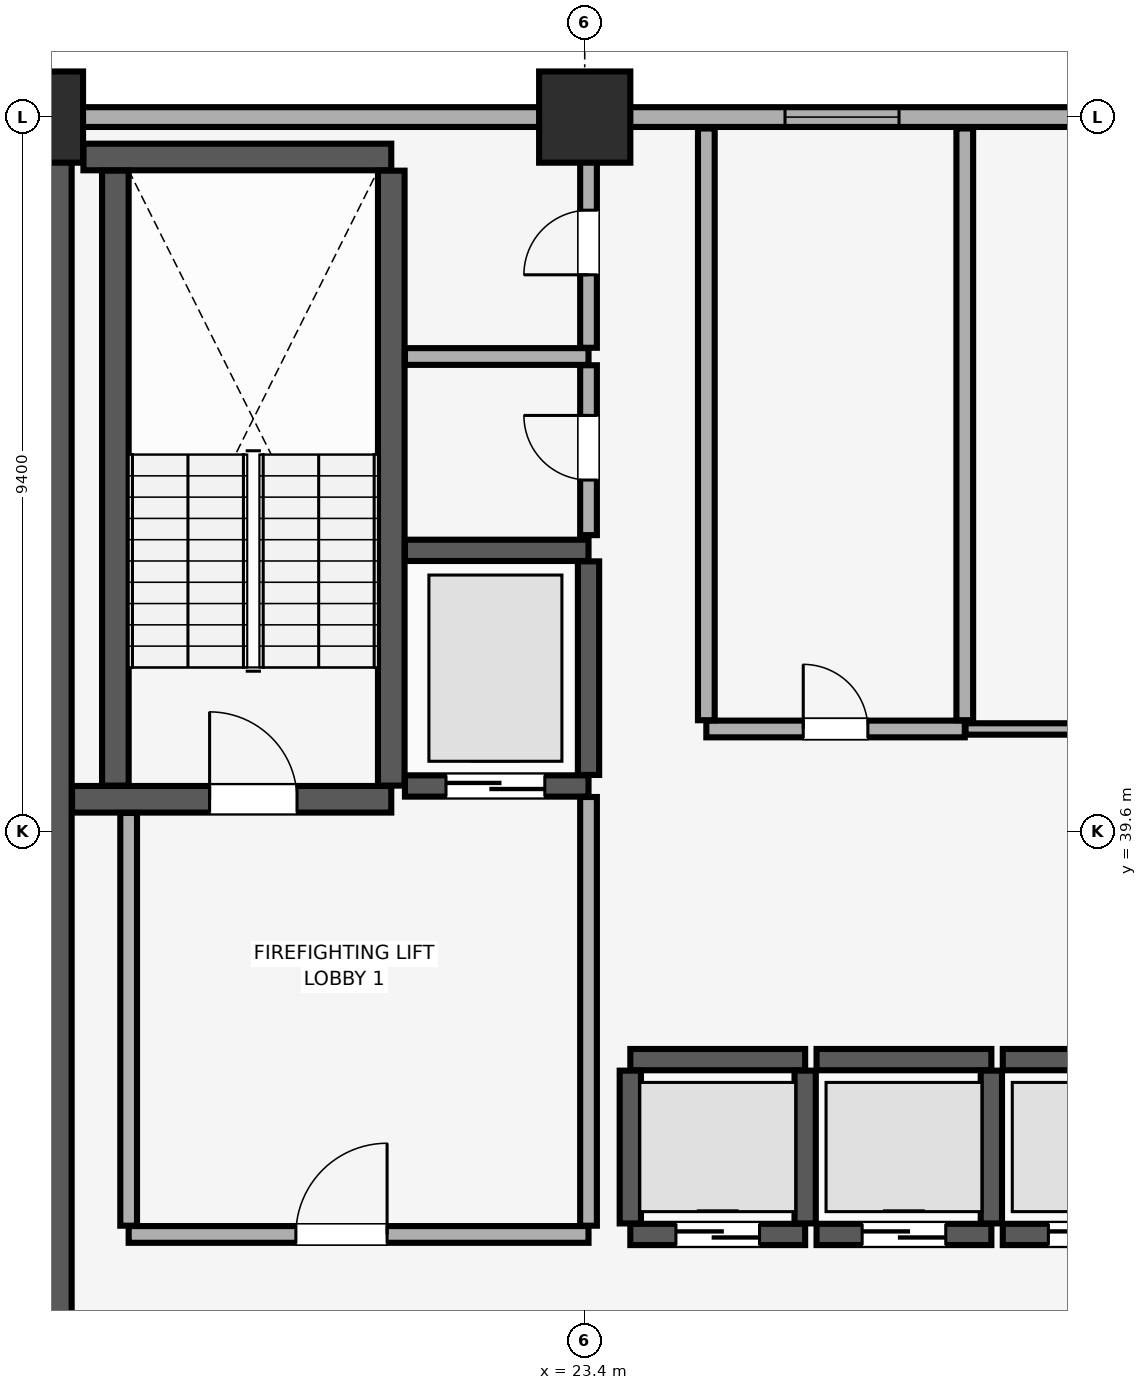
"""IFC4 building model, lengths in metres.
Left out: names, types, materials, properties, quantities, classifications, styles, units other than length and angle.
Written with IfcOpenShell. Run it as: python <this file> out.ifc"""

import sys

from ifc_helpers import new_model, si_unit, direction, frame, frame_2d, origin, origin_2d, place, context, subcontext, project, spatial, rectangle, extrude, element, fill, save


model = new_model("IFC4")
c1 = context("Model", 3, precision=1e-05, world=origin(), true_north=direction((0.0, 1.0)))
c2 = subcontext(c1, "Body", "Model", "MODEL_VIEW")
j1 = project(units=[si_unit("LENGTHUNIT", "METRE"), si_unit("PLANEANGLEUNIT", "RADIAN")], contexts=[c1])
p1 = place(None, origin())
s1 = spatial("IfcSite", under=j1, at=p1, CompositionType="ELEMENT")
p2 = place(p1, origin())
s2 = spatial("IfcBuilding", under=s1, at=p2, CompositionType="ELEMENT")
p3 = place(p2, frame((0.0, 0.0, 93.05)))
s3 = spatial("IfcBuildingStorey", under=s2, at=p3, CompositionType="ELEMENT", Elevation=93.05)
for number, where, z_axis, x_axis in (
    (1, (16.2, 49.0, 0.0), (0.0, 0.0, 1.0), (1.0, 0.0, 0.0)),
    (2, (23.4, 49.0, 0.0), (0.0, 0.0, 1.0), (1.0, 0.0, 0.0)),
):
    element("IfcColumn", number, at=place(p3, frame(where, z_axis=z_axis, x_axis=x_axis)), inside=s3, PredefinedType="COLUMN", context=c2, shape_type="SweptSolid", body=[
        extrude(rectangle(XDim=1.2, YDim=1.2, at=origin_2d()), origin(), (0.0, 0.0, 1.0), 3.51),
    ])
p4 = place(p3, frame((79.8, 49.0, 0.0), z_axis=(0.0, 0.0, 1.0), x_axis=(-1.0, 0.0, 0.0)))
e3 = element("IfcWall", 3, at=p4, inside=s3, PredefinedType="SOLIDWALL", context=c2, shape_type="SweptSolid", body=[
    extrude(rectangle(XDim=75.6, YDim=0.26, at=frame_2d((37.8, 0.0))), origin(), (0.0, 0.0, 1.0), 2.56),
])
p5 = place(p4, frame((72.565, 0.0, 0.85)))
e4 = element("IfcOpeningElement", 4, at=p5, cuts=e3, PredefinedType="OPENING", context=c2, shape_type="SweptSolid", body=[
    extrude(rectangle(XDim=1.5, YDim=1.4, at=frame_2d((0.75, 0.7))), frame((0.0, 0.14, 0.0), z_axis=(0.0, -1.0, 0.0), x_axis=(1.0, 0.0, 0.0)), (0.0, 0.0, 1.0), 0.28),
])
p6 = place(p4, frame((67.45, 0.0, 0.85)))
e5 = element("IfcOpeningElement", 5, at=p6, cuts=e3, PredefinedType="OPENING", context=c2, shape_type="SweptSolid", body=[
    extrude(rectangle(XDim=1.5, YDim=1.4, at=frame_2d((0.75, 0.7))), frame((0.0, 0.14, 0.0), z_axis=(0.0, -1.0, 0.0), x_axis=(1.0, 0.0, 0.0)), (0.0, 0.0, 1.0), 0.28),
])
p7 = place(p4, frame((7.6, 0.0, 0.85)))
e6 = element("IfcOpeningElement", 6, at=p7, cuts=e3, PredefinedType="OPENING", context=c2, shape_type="SweptSolid", body=[
    extrude(rectangle(XDim=1.5, YDim=1.4, at=frame_2d((0.75, 0.7))), frame((0.0, 0.14, 0.0), z_axis=(0.0, -1.0, 0.0), x_axis=(1.0, 0.0, 0.0)), (0.0, 0.0, 1.0), 0.28),
])
p8 = place(p4, frame((1.535, 0.0, 0.85)))
e7 = element("IfcOpeningElement", 7, at=p8, cuts=e3, PredefinedType="OPENING", context=c2, shape_type="SweptSolid", body=[
    extrude(rectangle(XDim=1.5, YDim=1.4, at=frame_2d((0.75, 0.7))), frame((0.0, 0.14, 0.0), z_axis=(0.0, -1.0, 0.0), x_axis=(1.0, 0.0, 0.0)), (0.0, 0.0, 1.0), 0.28),
])
p9 = place(p4, frame((52.265, 0.0, 0.9)))
e8 = element("IfcOpeningElement", 8, at=p9, cuts=e3, PredefinedType="OPENING", context=c2, shape_type="SweptSolid", body=[
    extrude(rectangle(XDim=1.5, YDim=1.4, at=frame_2d((0.75, 0.7))), frame((0.0, 0.14, 0.0), z_axis=(0.0, -1.0, 0.0), x_axis=(1.0, 0.0, 0.0)), (0.0, 0.0, 1.0), 0.28),
])
p10 = place(p4, frame((45.5, 0.0, 0.9)))
e9 = element("IfcOpeningElement", 9, at=p10, cuts=e3, PredefinedType="OPENING", context=c2, shape_type="SweptSolid", body=[
    extrude(rectangle(XDim=1.5, YDim=1.4, at=frame_2d((0.75, 0.7))), frame((0.0, 0.14, 0.0), z_axis=(0.0, -1.0, 0.0), x_axis=(1.0, 0.0, 0.0)), (0.0, 0.0, 1.0), 0.28),
])
p11 = place(p4, frame((31.05, 0.0, 0.9)))
e10 = element("IfcOpeningElement", 10, at=p11, cuts=e3, PredefinedType="OPENING", context=c2, shape_type="SweptSolid", body=[
    extrude(rectangle(XDim=1.5, YDim=1.4, at=frame_2d((0.75, 0.7))), frame((0.0, 0.14, 0.0), z_axis=(0.0, -1.0, 0.0), x_axis=(1.0, 0.0, 0.0)), (0.0, 0.0, 1.0), 0.28),
])
p12 = place(p4, frame((27.85, 0.0, 0.9)))
e11 = element("IfcOpeningElement", 11, at=p12, cuts=e3, PredefinedType="OPENING", context=c2, shape_type="SweptSolid", body=[
    extrude(rectangle(XDim=1.5, YDim=1.4, at=frame_2d((0.75, 0.7))), frame((0.0, 0.14, 0.0), z_axis=(0.0, -1.0, 0.0), x_axis=(1.0, 0.0, 0.0)), (0.0, 0.0, 1.0), 0.28),
])
p13 = place(p4, frame((23.485, 0.0, 0.9)))
e12 = element("IfcOpeningElement", 12, at=p13, cuts=e3, PredefinedType="OPENING", context=c2, shape_type="SweptSolid", body=[
    extrude(rectangle(XDim=1.5, YDim=1.4, at=frame_2d((0.75, 0.7))), frame((0.0, 0.14, 0.0), z_axis=(0.0, -1.0, 0.0), x_axis=(1.0, 0.0, 0.0)), (0.0, 0.0, 1.0), 0.28),
])
p14 = place(p3, frame((16.2, 29.4, 0.0), z_axis=(0.0, 0.0, 1.0), x_axis=(0.0, 1.0, 0.0)))
e13 = element("IfcWall", 13, at=p14, inside=s3, PredefinedType="SHEAR", context=c2, shape_type="SweptSolid", body=[
    extrude(rectangle(XDim=19.2, YDim=0.9, at=frame_2d((9.6, 0.0))), origin(), (0.0, 0.0, 1.0), 3.51),
])
p15 = place(p3, frame((16.655, 40.025, 0.0), z_axis=(0.0, 0.0, 1.0), x_axis=(1.0, 0.0, 0.0)))
e14 = element("IfcWall", 14, at=p15, inside=s3, PredefinedType="SHEAR", context=c2, shape_type="SweptSolid", body=[
    extrude(rectangle(XDim=4.2, YDim=0.35, at=frame_2d((2.1, 0.0))), origin(), (0.0, 0.0, 1.0), 3.51),
])
p16 = place(p15, frame((1.81, 0.0, 0.0)))
e15 = element("IfcOpeningElement", 15, at=p16, cuts=e14, PredefinedType="OPENING", context=c2, shape_type="SweptSolid", body=[
    extrude(rectangle(XDim=1.15, YDim=2.15, at=frame_2d((0.575, 1.075))), frame((0.0, 0.185, 0.0), z_axis=(0.0, -1.0, 0.0), x_axis=(1.0, 0.0, 0.0)), (0.0, 0.0, 1.0), 0.37),
])
p17 = place(p3, frame((16.805, 48.475, 0.0), z_axis=(0.0, 0.0, 1.0), x_axis=(1.0, 0.0, 0.0)))
e16 = element("IfcWall", 16, at=p17, inside=s3, PredefinedType="SHEAR", context=c2, shape_type="SweptSolid", body=[
    extrude(rectangle(XDim=4.05, YDim=0.35, at=frame_2d((2.025, 0.0))), origin(), (0.0, 0.0, 1.0), 3.51),
])
for number, where, z_axis, x_axis in (
    (17, (17.225, 40.205, 0.0), (0.0, 0.0, 1.0), (0.0, 1.0, 0.0)),
    (18, (20.855, 40.205, 0.0), (0.0, 0.0, 1.0), (0.0, 1.0, 0.0)),
):
    element("IfcWall", number, at=place(p3, frame(where, z_axis=z_axis, x_axis=x_axis)), inside=s3, PredefinedType="SHEAR", context=c2, shape_type="SweptSolid", body=[
        extrude(rectangle(XDim=8.09, YDim=0.35, at=frame_2d((4.045, 0.0))), origin(), (0.0, 0.0, 1.0), 3.51),
    ])
p18 = place(p3, frame((24.0, 34.3, 0.0), z_axis=(0.0, 0.0, 1.0), x_axis=(1.0, 0.0, 0.0)))
e19 = element("IfcWall", 19, at=p18, inside=s3, PredefinedType="SHEAR", context=c2, shape_type="SweptSolid", body=[
    extrude(rectangle(XDim=2.3, YDim=0.28, at=frame_2d((1.15, 0.0))), origin(), (0.0, 0.0, 1.0), 3.51),
])
p19 = place(p18, frame((0.6, 0.0, 0.0)))
e20 = element("IfcOpeningElement", 20, at=p19, cuts=e19, PredefinedType="OPENING", context=c2, shape_type="SweptSolid", body=[
    extrude(rectangle(XDim=1.1, YDim=2.2, at=frame_2d((0.55, 1.1))), frame((0.0, 0.15, 0.0), z_axis=(0.0, -1.0, 0.0), x_axis=(1.0, 0.0, 0.0)), (0.0, 0.0, 1.0), 0.3),
])
p20 = place(p3, frame((24.0, 36.6, 0.0), z_axis=(0.0, 0.0, 1.0), x_axis=(1.0, 0.0, 0.0)))
e21 = element("IfcWall", 21, at=p20, inside=s3, PredefinedType="SHEAR", context=c2, shape_type="SweptSolid", body=[
    extrude(rectangle(XDim=2.3, YDim=0.28, at=frame_2d((1.15, 0.0))), origin(), (0.0, 0.0, 1.0), 3.51),
])
for number, where, z_axis, x_axis in (
    (22, (24.0, 34.445, 0.0), (0.0, 0.0, 1.0), (0.0, 1.0, 0.0)),
    (23, (26.3, 34.445, 0.0), (0.0, 0.0, 1.0), (0.0, 1.0, 0.0)),
):
    element("IfcWall", number, at=place(p3, frame(where, z_axis=z_axis, x_axis=x_axis)), inside=s3, PredefinedType="SHEAR", context=c2, shape_type="SweptSolid", body=[
        extrude(rectangle(XDim=2.01, YDim=0.28, at=frame_2d((1.005, 0.0))), origin(), (0.0, 0.0, 1.0), 3.51),
    ])
p21 = place(p3, frame((26.45, 34.3, 0.0), z_axis=(0.0, 0.0, 1.0), x_axis=(1.0, 0.0, 0.0)))
e24 = element("IfcWall", 24, at=p21, inside=s3, PredefinedType="SHEAR", context=c2, shape_type="SweptSolid", body=[
    extrude(rectangle(XDim=2.3, YDim=0.28, at=frame_2d((1.15, 0.0))), origin(), (0.0, 0.0, 1.0), 3.51),
])
p22 = place(p21, frame((0.6, 0.0, 0.0)))
e25 = element("IfcOpeningElement", 25, at=p22, cuts=e24, PredefinedType="OPENING", context=c2, shape_type="SweptSolid", body=[
    extrude(rectangle(XDim=1.1, YDim=2.2, at=frame_2d((0.55, 1.1))), frame((0.0, 0.15, 0.0), z_axis=(0.0, -1.0, 0.0), x_axis=(1.0, 0.0, 0.0)), (0.0, 0.0, 1.0), 0.3),
])
p23 = place(p3, frame((26.45, 36.6, 0.0), z_axis=(0.0, 0.0, 1.0), x_axis=(1.0, 0.0, 0.0)))
e26 = element("IfcWall", 26, at=p23, inside=s3, PredefinedType="SHEAR", context=c2, shape_type="SweptSolid", body=[
    extrude(rectangle(XDim=2.3, YDim=0.28, at=frame_2d((1.15, 0.0))), origin(), (0.0, 0.0, 1.0), 3.51),
])
p24 = place(p3, frame((28.75, 34.445, 0.0), z_axis=(0.0, 0.0, 1.0), x_axis=(0.0, 1.0, 0.0)))
e27 = element("IfcWall", 27, at=p24, inside=s3, PredefinedType="SHEAR", context=c2, shape_type="SweptSolid", body=[
    extrude(rectangle(XDim=2.01, YDim=0.28, at=frame_2d((1.005, 0.0))), origin(), (0.0, 0.0, 1.0), 3.51),
])
p25 = place(p3, frame((28.9, 34.3, 0.0), z_axis=(0.0, 0.0, 1.0), x_axis=(1.0, 0.0, 0.0)))
e28 = element("IfcWall", 28, at=p25, inside=s3, PredefinedType="SHEAR", context=c2, shape_type="SweptSolid", body=[
    extrude(rectangle(XDim=2.3, YDim=0.28, at=frame_2d((1.15, 0.0))), origin(), (0.0, 0.0, 1.0), 3.51),
])
p26 = place(p25, frame((0.6, 0.0, 0.0)))
e29 = element("IfcOpeningElement", 29, at=p26, cuts=e28, PredefinedType="OPENING", context=c2, shape_type="SweptSolid", body=[
    extrude(rectangle(XDim=1.1, YDim=2.2, at=frame_2d((0.55, 1.1))), frame((0.0, 0.15, 0.0), z_axis=(0.0, -1.0, 0.0), x_axis=(1.0, 0.0, 0.0)), (0.0, 0.0, 1.0), 0.3),
])
p27 = place(p3, frame((28.9, 36.6, 0.0), z_axis=(0.0, 0.0, 1.0), x_axis=(1.0, 0.0, 0.0)))
e30 = element("IfcWall", 30, at=p27, inside=s3, PredefinedType="SHEAR", context=c2, shape_type="SweptSolid", body=[
    extrude(rectangle(XDim=2.3, YDim=0.28, at=frame_2d((1.15, 0.0))), origin(), (0.0, 0.0, 1.0), 3.51),
])
p28 = place(p3, frame((21.035, 40.2, 0.0), z_axis=(0.0, 0.0, 1.0), x_axis=(1.0, 0.0, 0.0)))
e31 = element("IfcWall", 31, at=p28, inside=s3, PredefinedType="SHEAR", context=c2, shape_type="SweptSolid", body=[
    extrude(rectangle(XDim=2.415, YDim=0.28, at=frame_2d((1.208, 0.0))), origin(), (0.0, 0.0, 1.0), 3.51),
])
p29 = place(p28, frame((0.54, 0.0, 0.0)))
e32 = element("IfcOpeningElement", 32, at=p29, cuts=e31, PredefinedType="OPENING", context=c2, shape_type="SweptSolid", body=[
    extrude(rectangle(XDim=1.3, YDim=2.3, at=frame_2d((0.65, 1.15))), frame((0.0, 0.15, 0.0), z_axis=(0.0, -1.0, 0.0), x_axis=(1.0, 0.0, 0.0)), (0.0, 0.0, 1.0), 0.3),
])
p30 = place(p3, frame((21.035, 43.3, 0.0), z_axis=(0.0, 0.0, 1.0), x_axis=(1.0, 0.0, 0.0)))
e33 = element("IfcWall", 33, at=p30, inside=s3, PredefinedType="SHEAR", context=c2, shape_type="SweptSolid", body=[
    extrude(rectangle(XDim=2.415, YDim=0.28, at=frame_2d((1.208, 0.0))), origin(), (0.0, 0.0, 1.0), 3.51),
])
p31 = place(p3, frame((23.45, 40.345, 0.0), z_axis=(0.0, 0.0, 1.0), x_axis=(0.0, 1.0, 0.0)))
e34 = element("IfcWall", 34, at=p31, inside=s3, PredefinedType="SHEAR", context=c2, shape_type="SweptSolid", body=[
    extrude(rectangle(XDim=2.81, YDim=0.28, at=frame_2d((1.405, 0.0))), origin(), (0.0, 0.0, 1.0), 3.51),
])
p32 = place(p3, frame((17.4, 34.3, 0.0), z_axis=(0.0, 0.0, 1.0), x_axis=(1.0, 0.0, 0.0)))
e35 = element("IfcWall", 35, at=p32, inside=s3, PredefinedType="PARTITIONING", context=c2, shape_type="SweptSolid", body=[
    extrude(rectangle(XDim=6.05, YDim=0.22, at=frame_2d((3.025, 0.0))), origin(), (0.0, 0.0, 1.0), 3.51),
])
p33 = place(p32, frame((2.2, 0.0, 0.0)))
e36 = element("IfcOpeningElement", 36, at=p33, cuts=e35, PredefinedType="OPENING", context=c2, shape_type="SweptSolid", body=[
    extrude(rectangle(XDim=1.2, YDim=2.15, at=frame_2d((0.6, 1.075))), frame((0.0, 0.12, 0.0), z_axis=(0.0, -1.0, 0.0), x_axis=(1.0, 0.0, 0.0)), (0.0, 0.0, 1.0), 0.24),
])
p34 = place(p3, frame((17.4, 34.415, 0.0), z_axis=(0.0, 0.0, 1.0), x_axis=(0.0, 1.0, 0.0)))
e37 = element("IfcWall", 37, at=p34, inside=s3, PredefinedType="PARTITIONING", context=c2, shape_type="SweptSolid", body=[
    extrude(rectangle(XDim=5.43, YDim=0.22, at=frame_2d((2.715, 0.0))), origin(), (0.0, 0.0, 1.0), 3.51),
])
p35 = place(p3, frame((23.45, 34.415, 0.0), z_axis=(0.0, 0.0, 1.0), x_axis=(0.0, 1.0, 0.0)))
e38 = element("IfcWall", 38, at=p35, inside=s3, PredefinedType="PARTITIONING", context=c2, shape_type="SweptSolid", body=[
    extrude(rectangle(XDim=5.64, YDim=0.22, at=frame_2d((2.82, 0.0))), origin(), (0.0, 0.0, 1.0), 3.51),
])
p36 = place(p3, frame((21.035, 45.85, 0.0), z_axis=(0.0, 0.0, 1.0), x_axis=(1.0, 0.0, 0.0)))
e39 = element("IfcWall", 39, at=p36, inside=s3, PredefinedType="PARTITIONING", context=c2, shape_type="SweptSolid", body=[
    extrude(rectangle(XDim=2.415, YDim=0.22, at=frame_2d((1.208, 0.0))), origin(), (0.0, 0.0, 1.0), 3.51),
])
p37 = place(p3, frame((23.45, 43.5, 0.0), z_axis=(0.0, 0.0, 1.0), x_axis=(0.0, 1.0, 0.0)))
e40 = element("IfcWall", 40, at=p37, inside=s3, PredefinedType="PARTITIONING", context=c2, shape_type="SweptSolid", body=[
    extrude(rectangle(XDim=2.235, YDim=0.22, at=frame_2d((1.118, 0.0))), origin(), (0.0, 0.0, 1.0), 3.51),
])
p38 = place(p37, frame((0.725, 0.0, 0.0)))
e41 = element("IfcOpeningElement", 41, at=p38, cuts=e40, PredefinedType="OPENING", context=c2, shape_type="SweptSolid", body=[
    extrude(rectangle(XDim=0.85, YDim=2.1, at=frame_2d((0.425, 1.05))), frame((0.0, 0.12, 0.0), z_axis=(0.0, -1.0, 0.0), x_axis=(1.0, 0.0, 0.0)), (0.0, 0.0, 1.0), 0.24),
])
p39 = place(p3, frame((23.45, 45.965, 0.0), z_axis=(0.0, 0.0, 1.0), x_axis=(0.0, 1.0, 0.0)))
e42 = element("IfcWall", 42, at=p39, inside=s3, PredefinedType="PARTITIONING", context=c2, shape_type="SweptSolid", body=[
    extrude(rectangle(XDim=2.885, YDim=0.22, at=frame_2d((1.442, 0.0))), origin(), (0.0, 0.0, 1.0), 3.51),
])
p40 = place(p39, frame((0.96, 0.0, 0.0)))
e43 = element("IfcOpeningElement", 43, at=p40, cuts=e42, PredefinedType="OPENING", context=c2, shape_type="SweptSolid", body=[
    extrude(rectangle(XDim=0.85, YDim=2.1, at=frame_2d((0.425, 1.05))), frame((0.0, 0.12, 0.0), z_axis=(0.0, -1.0, 0.0), x_axis=(1.0, 0.0, 0.0)), (0.0, 0.0, 1.0), 0.24),
])
p41 = place(p3, frame((25.0, 40.95, 0.0), z_axis=(0.0, 0.0, 1.0), x_axis=(1.0, 0.0, 0.0)))
e44 = element("IfcWall", 44, at=p41, inside=s3, PredefinedType="PARTITIONING", context=c2, shape_type="SweptSolid", body=[
    extrude(rectangle(XDim=3.4, YDim=0.22, at=frame_2d((1.7, 0.0))), origin(), (0.0, 0.0, 1.0), 3.51),
])
p42 = place(p41, frame((1.275, 0.0, 0.0)))
e45 = element("IfcOpeningElement", 45, at=p42, cuts=e44, PredefinedType="OPENING", context=c2, shape_type="SweptSolid", body=[
    extrude(rectangle(XDim=0.85, YDim=2.1, at=frame_2d((0.425, 1.05))), frame((0.0, 0.12, 0.0), z_axis=(0.0, -1.0, 0.0), x_axis=(1.0, 0.0, 0.0)), (0.0, 0.0, 1.0), 0.24),
])
for number, where, z_axis, x_axis in (
    (46, (25.0, 41.065, 0.0), (0.0, 0.0, 1.0), (0.0, 1.0, 0.0)),
    (47, (28.4, 41.065, 0.0), (0.0, 0.0, 1.0), (0.0, 1.0, 0.0)),
):
    element("IfcWall", number, at=place(p3, frame(where, z_axis=z_axis, x_axis=x_axis)), inside=s3, PredefinedType="PARTITIONING", context=c2, shape_type="SweptSolid", body=[
        extrude(rectangle(XDim=7.785, YDim=0.22, at=frame_2d((3.893, 0.0))), origin(), (0.0, 0.0, 1.0), 3.51),
    ])
p43 = place(p3, frame((28.41, 40.95, 0.0), z_axis=(0.0, 0.0, 1.0), x_axis=(1.0, 0.0, 0.0)))
e48 = element("IfcWall", 48, at=p43, inside=s3, PredefinedType="PARTITIONING", context=c2, shape_type="SweptSolid", body=[
    extrude(rectangle(XDim=7.69, YDim=0.15, at=frame_2d((3.845, 0.0))), origin(), (0.0, 0.0, 1.0), 3.51),
])
p44 = place(p43, frame((3.415, 0.0, 0.0)))
e49 = element("IfcOpeningElement", 49, at=p44, cuts=e48, PredefinedType="OPENING", context=c2, shape_type="SweptSolid", body=[
    extrude(rectangle(XDim=0.85, YDim=2.1, at=frame_2d((0.425, 1.05))), frame((0.0, 0.085, 0.0), z_axis=(0.0, -1.0, 0.0), x_axis=(1.0, 0.0, 0.0)), (0.0, 0.0, 1.0), 0.17),
])
p45 = place(p9, origin())
e50 = element("IfcWindow", 50, at=p45, inside=s3, PartitioningType="SINGLE_PANEL", PredefinedType="WINDOW", context=c2, shape_type="SweptSolid", body=[
    extrude(rectangle(XDim=1.5, YDim=1.4, at=frame_2d((0.75, 0.7))), frame((0.0, 0.03, 0.0), z_axis=(0.0, -1.0, 0.0), x_axis=(1.0, 0.0, 0.0)), (0.0, 0.0, 1.0), 0.06),
])
fill(e8, e50)
p46 = place(p16, origin())
e51 = element("IfcDoor", 51, at=p46, inside=s3, OperationType="SINGLE_SWING_LEFT", PredefinedType="DOOR", context=c2, shape_type="SweptSolid", body=[
    extrude(rectangle(XDim=1.15, YDim=2.15, at=frame_2d((0.575, 1.075))), frame((0.0, 0.025, 0.0), z_axis=(0.0, -1.0, 0.0), x_axis=(1.0, 0.0, 0.0)), (0.0, 0.0, 1.0), 0.05),
])
fill(e15, e51)
p47 = place(p19, origin())
e52 = element("IfcDoor", 52, at=p47, inside=s3, OperationType="DOUBLE_DOOR_SLIDING", PredefinedType="DOOR", context=c2, shape_type="SweptSolid", body=[
    extrude(rectangle(XDim=1.1, YDim=2.2, at=frame_2d((0.55, 1.1))), frame((0.0, 0.025, 0.0), z_axis=(0.0, -1.0, 0.0), x_axis=(1.0, 0.0, 0.0)), (0.0, 0.0, 1.0), 0.05),
])
fill(e20, e52)
p48 = place(p22, origin())
e53 = element("IfcDoor", 53, at=p48, inside=s3, OperationType="DOUBLE_DOOR_SLIDING", PredefinedType="DOOR", context=c2, shape_type="SweptSolid", body=[
    extrude(rectangle(XDim=1.1, YDim=2.2, at=frame_2d((0.55, 1.1))), frame((0.0, 0.025, 0.0), z_axis=(0.0, -1.0, 0.0), x_axis=(1.0, 0.0, 0.0)), (0.0, 0.0, 1.0), 0.05),
])
fill(e25, e53)
p49 = place(p26, origin())
e54 = element("IfcDoor", 54, at=p49, inside=s3, OperationType="DOUBLE_DOOR_SLIDING", PredefinedType="DOOR", context=c2, shape_type="SweptSolid", body=[
    extrude(rectangle(XDim=1.1, YDim=2.2, at=frame_2d((0.55, 1.1))), frame((0.0, 0.025, 0.0), z_axis=(0.0, -1.0, 0.0), x_axis=(1.0, 0.0, 0.0)), (0.0, 0.0, 1.0), 0.05),
])
fill(e29, e54)
p50 = place(p29, origin())
e55 = element("IfcDoor", 55, at=p50, inside=s3, OperationType="DOUBLE_DOOR_SLIDING", PredefinedType="DOOR", context=c2, shape_type="SweptSolid", body=[
    extrude(rectangle(XDim=1.3, YDim=2.3, at=frame_2d((0.65, 1.15))), frame((0.0, 0.025, 0.0), z_axis=(0.0, -1.0, 0.0), x_axis=(1.0, 0.0, 0.0)), (0.0, 0.0, 1.0), 0.05),
])
fill(e32, e55)
p51 = place(p33, origin())
e56 = element("IfcDoor", 56, at=p51, inside=s3, OperationType="SINGLE_SWING_RIGHT", PredefinedType="DOOR", context=c2, shape_type="SweptSolid", body=[
    extrude(rectangle(XDim=1.2, YDim=2.15, at=frame_2d((0.6, 1.075))), frame((0.0, 0.025, 0.0), z_axis=(0.0, -1.0, 0.0), x_axis=(1.0, 0.0, 0.0)), (0.0, 0.0, 1.0), 0.05),
])
fill(e36, e56)
p52 = place(p38, origin())
e57 = element("IfcDoor", 57, at=p52, inside=s3, OperationType="SINGLE_SWING_RIGHT", PredefinedType="DOOR", context=c2, shape_type="SweptSolid", body=[
    extrude(rectangle(XDim=0.85, YDim=2.1, at=frame_2d((0.425, 1.05))), frame((0.0, 0.025, 0.0), z_axis=(0.0, -1.0, 0.0), x_axis=(1.0, 0.0, 0.0)), (0.0, 0.0, 1.0), 0.05),
])
fill(e41, e57)
p53 = place(p40, origin())
e58 = element("IfcDoor", 58, at=p53, inside=s3, OperationType="SINGLE_SWING_LEFT", PredefinedType="DOOR", context=c2, shape_type="SweptSolid", body=[
    extrude(rectangle(XDim=0.85, YDim=2.1, at=frame_2d((0.425, 1.05))), frame((0.0, 0.025, 0.0), z_axis=(0.0, -1.0, 0.0), x_axis=(1.0, 0.0, 0.0)), (0.0, 0.0, 1.0), 0.05),
])
fill(e43, e58)
p54 = place(p42, origin())
e59 = element("IfcDoor", 59, at=p54, inside=s3, OperationType="SINGLE_SWING_LEFT", PredefinedType="DOOR", context=c2, shape_type="SweptSolid", body=[
    extrude(rectangle(XDim=0.85, YDim=2.1, at=frame_2d((0.425, 1.05))), frame((0.0, 0.025, 0.0), z_axis=(0.0, -1.0, 0.0), x_axis=(1.0, 0.0, 0.0)), (0.0, 0.0, 1.0), 0.05),
])
fill(e45, e59)
save(model, sys.argv[1])
